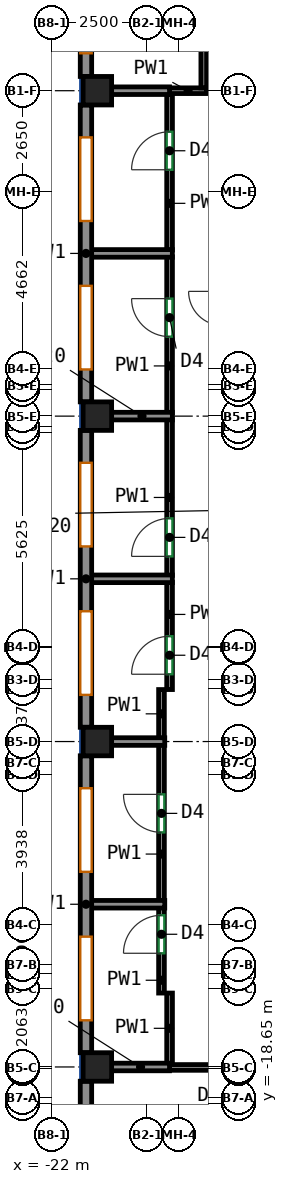
"""IFC4 building model, lengths in metres.
Left out: names, types, materials, properties, quantities, classifications, styles, units other than length and angle.
Written with IfcOpenShell. Run it as: python <this file> out.ifc"""

import sys

from ifc_helpers import new_model, si_unit, direction, frame, frame_2d, origin, origin_2d, place, context, subcontext, project, spatial, rectangle, extrude, source, transform, mapped, element, fill, save


model = new_model("IFC4")
c1 = context("Model", 3, precision=1e-05, world=origin(), true_north=direction((0.0, 1.0)))
c2 = subcontext(c1, "Body", "Model", "MODEL_VIEW")
j1 = project(units=[si_unit("LENGTHUNIT", "METRE"), si_unit("PLANEANGLEUNIT", "RADIAN")], contexts=[c1])
p1 = place(None, origin())
s1 = spatial("IfcSite", under=j1, at=p1, CompositionType="ELEMENT")
p2 = place(p1, origin())
s2 = spatial("IfcBuilding", under=s1, at=p2, CompositionType="ELEMENT")
p3 = place(p2, frame((0.0, 0.0, 206.7)))
s3 = spatial("IfcBuildingStorey", under=s2, at=p3, CompositionType="ELEMENT", Elevation=206.7)
m1 = source(origin(), c2, "Body", "SweptSolid", [
    extrude(rectangle(XDim=0.75, YDim=0.75, at=origin_2d()), origin(), (0.0, 0.0, 1.0), 3.12),
])
for number, where, z_axis, x_axis in (
    (1, (-20.8, -17.688, 0.0), (0.0, 0.0, 1.0), (1.0, 0.0, 0.0)),
    (2, (-20.8, -9.125, 0.0), (0.0, 0.0, 1.0), (1.0, 0.0, 0.0)),
    (3, (-20.8, -0.562, 0.0), (0.0, 0.0, 1.0), (1.0, 0.0, 0.0)),
    (4, (-20.8, 8.0, 0.0), (0.0, 0.0, 1.0), (1.0, 0.0, 0.0)),
):
    element("IfcColumn", number, at=place(p3, frame(where, z_axis=z_axis, x_axis=x_axis)), inside=s3, PredefinedType="COLUMN", context=c2, shape_type="MappedRepresentation", body=[
        mapped(m1, transform((0.0, 0.0, 0.0))),
    ])
m2 = source(origin(), c2, "Body", "SweptSolid", [
    extrude(rectangle(XDim=13.682, YDim=0.3, at=frame_2d((6.841, 0.0))), origin(), (0.0, 0.0, 1.0), 3.12),
])
p4 = place(p3, frame((-21.1, 22.057, 0.0), z_axis=(0.0, 0.0, 1.0), x_axis=(0.0, -1.0, 0.0)))
e5 = element("IfcWall", 5, at=p4, inside=s3, PredefinedType="SOLIDWALL", context=c2, shape_type="MappedRepresentation", body=[
    mapped(m2, transform((0.0, 0.0, 0.0))),
])
p5 = place(p4, frame((0.61, 0.0, 0.85)))
e6 = element("IfcOpeningElement", 6, at=p5, cuts=e5, PredefinedType="OPENING", context=c2, shape_type="SweptSolid", body=[
    extrude(rectangle(XDim=2.2, YDim=1.95, at=frame_2d((1.1, 0.975))), frame((0.0, 0.16, 0.0), z_axis=(0.0, -1.0, 0.0), x_axis=(1.0, 0.0, 0.0)), (0.0, 0.0, 1.0), 0.32),
])
p6 = place(p4, frame((4.031, 0.0, 0.85)))
e7 = element("IfcOpeningElement", 7, at=p6, cuts=e5, PredefinedType="OPENING", context=c2, shape_type="SweptSolid", body=[
    extrude(rectangle(XDim=2.2, YDim=1.95, at=frame_2d((1.1, 0.975))), frame((0.0, 0.16, 0.0), z_axis=(0.0, -1.0, 0.0), x_axis=(1.0, 0.0, 0.0)), (0.0, 0.0, 1.0), 0.32),
])
p7 = place(p4, frame((7.451, 0.0, 0.85)))
e8 = element("IfcOpeningElement", 8, at=p7, cuts=e5, PredefinedType="OPENING", context=c2, shape_type="SweptSolid", body=[
    extrude(rectangle(XDim=2.2, YDim=1.95, at=frame_2d((1.1, 0.975))), frame((0.0, 0.16, 0.0), z_axis=(0.0, -1.0, 0.0), x_axis=(1.0, 0.0, 0.0)), (0.0, 0.0, 1.0), 0.32),
])
p8 = place(p4, frame((10.872, 0.0, 0.85)))
e9 = element("IfcOpeningElement", 9, at=p8, cuts=e5, PredefinedType="OPENING", context=c2, shape_type="SweptSolid", body=[
    extrude(rectangle(XDim=2.2, YDim=1.95, at=frame_2d((1.1, 0.975))), frame((0.0, 0.16, 0.0), z_axis=(0.0, -1.0, 0.0), x_axis=(1.0, 0.0, 0.0)), (0.0, 0.0, 1.0), 0.32),
])
m3 = source(origin(), c2, "Body", "SweptSolid", [
    extrude(rectangle(XDim=7.812, YDim=0.3, at=frame_2d((3.906, 0.0))), origin(), (0.0, 0.0, 1.0), 3.12),
])
p9 = place(p3, frame((-21.1, 7.625, 0.0), z_axis=(0.0, 0.0, 1.0), x_axis=(0.0, -1.0, 0.0)))
e10 = element("IfcWall", 10, at=p9, inside=s3, PredefinedType="SOLIDWALL", context=c2, shape_type="MappedRepresentation", body=[
    mapped(m3, transform((0.0, 0.0, 0.0))),
])
p10 = place(p9, frame((0.853, 0.0, 0.85)))
e11 = element("IfcOpeningElement", 11, at=p10, cuts=e10, PredefinedType="OPENING", context=c2, shape_type="SweptSolid", body=[
    extrude(rectangle(XDim=2.2, YDim=1.95, at=frame_2d((1.1, 0.975))), frame((0.0, 0.16, 0.0), z_axis=(0.0, -1.0, 0.0), x_axis=(1.0, 0.0, 0.0)), (0.0, 0.0, 1.0), 0.32),
])
p11 = place(p9, frame((4.759, 0.0, 0.85)))
e12 = element("IfcOpeningElement", 12, at=p11, cuts=e10, PredefinedType="OPENING", context=c2, shape_type="SweptSolid", body=[
    extrude(rectangle(XDim=2.2, YDim=1.95, at=frame_2d((1.1, 0.975))), frame((0.0, 0.16, 0.0), z_axis=(0.0, -1.0, 0.0), x_axis=(1.0, 0.0, 0.0)), (0.0, 0.0, 1.0), 0.32),
])
p12 = place(p3, frame((-21.1, -0.938, 0.0), z_axis=(0.0, 0.0, 1.0), x_axis=(0.0, -1.0, 0.0)))
e13 = element("IfcWall", 13, at=p12, inside=s3, PredefinedType="SOLIDWALL", context=c2, shape_type="MappedRepresentation", body=[
    mapped(m3, transform((0.0, 0.0, 0.0))),
])
p13 = place(p12, frame((0.853, 0.0, 0.85)))
e14 = element("IfcOpeningElement", 14, at=p13, cuts=e13, PredefinedType="OPENING", context=c2, shape_type="SweptSolid", body=[
    extrude(rectangle(XDim=2.2, YDim=1.95, at=frame_2d((1.1, 0.975))), frame((0.0, 0.16, 0.0), z_axis=(0.0, -1.0, 0.0), x_axis=(1.0, 0.0, 0.0)), (0.0, 0.0, 1.0), 0.32),
])
p14 = place(p12, frame((4.76, 0.0, 0.85)))
e15 = element("IfcOpeningElement", 15, at=p14, cuts=e13, PredefinedType="OPENING", context=c2, shape_type="SweptSolid", body=[
    extrude(rectangle(XDim=2.2, YDim=1.95, at=frame_2d((1.1, 0.975))), frame((0.0, 0.16, 0.0), z_axis=(0.0, -1.0, 0.0), x_axis=(1.0, 0.0, 0.0)), (0.0, 0.0, 1.0), 0.32),
])
p15 = place(p3, frame((-21.1, -9.5, 0.0), z_axis=(0.0, 0.0, 1.0), x_axis=(0.0, -1.0, 0.0)))
e16 = element("IfcWall", 16, at=p15, inside=s3, PredefinedType="SOLIDWALL", context=c2, shape_type="MappedRepresentation", body=[
    mapped(m3, transform((0.0, 0.0, 0.0))),
])
p16 = place(p15, frame((0.853, 0.0, 0.85)))
e17 = element("IfcOpeningElement", 17, at=p16, cuts=e16, PredefinedType="OPENING", context=c2, shape_type="SweptSolid", body=[
    extrude(rectangle(XDim=2.2, YDim=1.95, at=frame_2d((1.1, 0.975))), frame((0.0, 0.16, 0.0), z_axis=(0.0, -1.0, 0.0), x_axis=(1.0, 0.0, 0.0)), (0.0, 0.0, 1.0), 0.32),
])
p17 = place(p15, frame((4.759, 0.0, 0.85)))
e18 = element("IfcOpeningElement", 18, at=p17, cuts=e16, PredefinedType="OPENING", context=c2, shape_type="SweptSolid", body=[
    extrude(rectangle(XDim=2.2, YDim=1.95, at=frame_2d((1.1, 0.975))), frame((0.0, 0.16, 0.0), z_axis=(0.0, -1.0, 0.0), x_axis=(1.0, 0.0, 0.0)), (0.0, 0.0, 1.0), 0.32),
])
m4 = source(origin(), c2, "Body", "SweptSolid", [
    extrude(rectangle(XDim=4.312, YDim=0.3, at=frame_2d((2.156, 0.0))), origin(), (0.0, 0.0, 1.0), 3.12),
])
p18 = place(p3, frame((-21.1, -18.062, 0.0), z_axis=(0.0, 0.0, 1.0), x_axis=(0.0, -1.0, 0.0)))
e19 = element("IfcWall", 19, at=p18, inside=s3, PredefinedType="SOLIDWALL", context=c2, shape_type="MappedRepresentation", body=[
    mapped(m4, transform((0.0, 0.0, 0.0))),
])
p19 = place(p18, frame((1.056, 0.0, 0.85)))
e20 = element("IfcOpeningElement", 20, at=p19, cuts=e19, PredefinedType="OPENING", context=c2, shape_type="SweptSolid", body=[
    extrude(rectangle(XDim=2.2, YDim=1.95, at=frame_2d((1.1, 0.975))), frame((0.0, 0.16, 0.0), z_axis=(0.0, -1.0, 0.0), x_axis=(1.0, 0.0, 0.0)), (0.0, 0.0, 1.0), 0.32),
])
p20 = place(p3, frame((-18.9, -17.7, 0.0), z_axis=(0.0, 0.0, 1.0), x_axis=(1.0, 0.0, 0.0)))
e21 = element("IfcWall", 21, at=p20, inside=s3, PredefinedType="PARTITIONING", context=c2, shape_type="SweptSolid", body=[
    extrude(rectangle(XDim=8.233, YDim=0.15, at=frame_2d((4.116, 0.0))), origin(), (0.0, 0.0, 1.0), 2.52),
])
p21 = place(p20, frame((1.135, 0.0, 0.0)))
e22 = element("IfcOpeningElement", 22, at=p21, cuts=e21, PredefinedType="OPENING", context=c2, shape_type="SweptSolid", body=[
    extrude(rectangle(XDim=1.0, YDim=2.1, at=frame_2d((0.5, 1.05))), frame((0.0, 0.085, 0.0), z_axis=(0.0, -1.0, 0.0), x_axis=(1.0, 0.0, 0.0)), (0.0, 0.0, 1.0), 0.17),
])
p22 = place(p20, frame((5.131, 0.0, 0.0)))
e23 = element("IfcOpeningElement", 23, at=p22, cuts=e21, PredefinedType="OPENING", context=c2, shape_type="SweptSolid", body=[
    extrude(rectangle(XDim=1.0, YDim=2.1, at=frame_2d((0.5, 1.05))), frame((0.0, 0.085, 0.0), z_axis=(0.0, -1.0, 0.0), x_axis=(1.0, 0.0, 0.0)), (0.0, 0.0, 1.0), 0.17),
])
p23 = place(p3, frame((-17.925, 8.0, 0.0), z_axis=(0.0, 0.0, 1.0), x_axis=(-1.0, 0.0, 0.0)))
e24 = element("IfcWall", 24, at=p23, inside=s3, PredefinedType="PARTITIONING", context=c2, shape_type="SweptSolid", body=[
    extrude(rectangle(XDim=0.976, YDim=0.15, at=frame_2d((0.488, 0.0))), origin(), (0.0, 0.0, 1.0), 3.12),
])
p24 = place(p3, frame((-18.0, 21.9, 0.0), z_axis=(0.0, 0.0, 1.0), x_axis=(0.0, -1.0, 0.0)))
e25 = element("IfcWall", 25, at=p24, inside=s3, PredefinedType="PARTITIONING", context=c2, shape_type="SweptSolid", body=[
    extrude(rectangle(XDim=13.825, YDim=0.15, at=frame_2d((6.913, 0.0))), origin(), (0.0, 0.0, 1.0), 3.12),
])
p25 = place(p24, frame((10.721, 0.0, 0.0)))
e26 = element("IfcOpeningElement", 26, at=p25, cuts=e25, PredefinedType="OPENING", context=c2, shape_type="SweptSolid", body=[
    extrude(rectangle(XDim=1.0, YDim=2.1, at=frame_2d((0.5, 1.05))), frame((0.0, 0.085, 0.0), z_axis=(0.0, -1.0, 0.0), x_axis=(1.0, 0.0, 0.0)), (0.0, 0.0, 1.0), 0.17),
])
p26 = place(p3, frame((-18.9, -17.598, 0.0), z_axis=(0.0, 0.0, 1.0), x_axis=(0.0, 1.0, 0.0)))
e27 = element("IfcWall", 27, at=p26, inside=s3, PredefinedType="PARTITIONING", context=c2, shape_type="SweptSolid", body=[
    extrude(rectangle(XDim=1.855, YDim=0.15, at=frame_2d((0.927, 0.0))), origin(), (0.0, 0.0, 1.0), 3.12),
])
p27 = place(p3, frame((-19.113, -15.743, 0.0), z_axis=(0.0, 0.0, 1.0), x_axis=(0.0, 1.0, 0.0)))
e28 = element("IfcWall", 28, at=p27, inside=s3, PredefinedType="PARTITIONING", context=c2, shape_type="SweptSolid", body=[
    extrude(rectangle(XDim=2.247, YDim=0.15, at=frame_2d((1.124, 0.0))), origin(), (0.0, 0.0, 1.0), 3.12),
])
p28 = place(p27, frame((1.047, 0.0, 0.0)))
e29 = element("IfcOpeningElement", 29, at=p28, cuts=e28, PredefinedType="OPENING", context=c2, shape_type="SweptSolid", body=[
    extrude(rectangle(XDim=1.0, YDim=2.1, at=frame_2d((0.5, 1.05))), frame((0.0, 0.085, 0.0), z_axis=(0.0, -1.0, 0.0), x_axis=(1.0, 0.0, 0.0)), (0.0, 0.0, 1.0), 0.17),
])
p29 = place(p3, frame((-19.113, -13.316, 0.0), z_axis=(0.0, 0.0, 1.0), x_axis=(0.0, 1.0, 0.0)))
e30 = element("IfcWall", 30, at=p29, inside=s3, PredefinedType="PARTITIONING", context=c2, shape_type="SweptSolid", body=[
    extrude(rectangle(XDim=4.101, YDim=0.15, at=frame_2d((2.05, 0.0))), origin(), (0.0, 0.0, 1.0), 3.12),
])
p30 = place(p29, frame((1.801, 0.0, 0.0)))
e31 = element("IfcOpeningElement", 31, at=p30, cuts=e30, PredefinedType="OPENING", context=c2, shape_type="SweptSolid", body=[
    extrude(rectangle(XDim=1.0, YDim=2.1, at=frame_2d((0.5, 1.05))), frame((0.0, 0.085, 0.0), z_axis=(0.0, -1.0, 0.0), x_axis=(1.0, 0.0, 0.0)), (0.0, 0.0, 1.0), 0.17),
])
p31 = place(p3, frame((-18.9, -7.757, 0.0), z_axis=(0.0, 0.0, 1.0), x_axis=(0.0, 1.0, 0.0)))
e32 = element("IfcWall", 32, at=p31, inside=s3, PredefinedType="PARTITIONING", context=c2, shape_type="SweptSolid", body=[
    extrude(rectangle(XDim=2.824, YDim=0.15, at=frame_2d((1.412, 0.0))), origin(), (0.0, 0.0, 1.0), 3.12),
])
p32 = place(p31, frame((0.403, 0.0, 0.0)))
e33 = element("IfcOpeningElement", 33, at=p32, cuts=e32, PredefinedType="OPENING", context=c2, shape_type="SweptSolid", body=[
    extrude(rectangle(XDim=1.0, YDim=2.1, at=frame_2d((0.5, 1.05))), frame((0.0, 0.085, 0.0), z_axis=(0.0, -1.0, 0.0), x_axis=(1.0, 0.0, 0.0)), (0.0, 0.0, 1.0), 0.17),
])
p33 = place(p3, frame((-19.113, -9.035, 0.0), z_axis=(0.0, 0.0, 1.0), x_axis=(0.0, 1.0, 0.0)))
e34 = element("IfcWall", 34, at=p33, inside=s3, PredefinedType="PARTITIONING", context=c2, shape_type="SweptSolid", body=[
    extrude(rectangle(XDim=1.278, YDim=0.15, at=frame_2d((0.639, 0.0))), origin(), (0.0, 0.0, 1.0), 3.12),
])
p34 = place(p3, frame((-18.9, -4.753, 0.0), z_axis=(0.0, 0.0, 1.0), x_axis=(0.0, 1.0, 0.0)))
e35 = element("IfcWall", 35, at=p34, inside=s3, PredefinedType="PARTITIONING", context=c2, shape_type="SweptSolid", body=[
    extrude(rectangle(XDim=4.101, YDim=0.15, at=frame_2d((2.05, 0.0))), origin(), (0.0, 0.0, 1.0), 3.12),
])
p35 = place(p34, frame((0.5, 0.0, 0.0)))
e36 = element("IfcOpeningElement", 36, at=p35, cuts=e35, PredefinedType="OPENING", context=c2, shape_type="SweptSolid", body=[
    extrude(rectangle(XDim=1.0, YDim=2.1, at=frame_2d((0.5, 1.05))), frame((0.0, 0.085, 0.0), z_axis=(0.0, -1.0, 0.0), x_axis=(1.0, 0.0, 0.0)), (0.0, 0.0, 1.0), 0.17),
])
p36 = place(p3, frame((-18.9, -0.472, 0.0), z_axis=(0.0, 0.0, 1.0), x_axis=(0.0, 1.0, 0.0)))
e37 = element("IfcWall", 37, at=p36, inside=s3, PredefinedType="PARTITIONING", context=c2, shape_type="SweptSolid", body=[
    extrude(rectangle(XDim=4.101, YDim=0.15, at=frame_2d((2.05, 0.0))), origin(), (0.0, 0.0, 1.0), 3.12),
])
p37 = place(p36, frame((2.001, 0.0, 0.0)))
e38 = element("IfcOpeningElement", 38, at=p37, cuts=e37, PredefinedType="OPENING", context=c2, shape_type="SweptSolid", body=[
    extrude(rectangle(XDim=1.0, YDim=2.1, at=frame_2d((0.5, 1.05))), frame((0.0, 0.085, 0.0), z_axis=(0.0, -1.0, 0.0), x_axis=(1.0, 0.0, 0.0)), (0.0, 0.0, 1.0), 0.17),
])
p38 = place(p3, frame((-18.9, 3.809, 0.0), z_axis=(0.0, 0.0, 1.0), x_axis=(0.0, 1.0, 0.0)))
e39 = element("IfcWall", 39, at=p38, inside=s3, PredefinedType="PARTITIONING", context=c2, shape_type="SweptSolid", body=[
    extrude(rectangle(XDim=4.092, YDim=0.15, at=frame_2d((2.046, 0.0))), origin(), (0.0, 0.0, 1.0), 3.12),
])
p39 = place(p38, frame((2.111, 0.0, 0.0)))
e40 = element("IfcOpeningElement", 40, at=p39, cuts=e39, PredefinedType="OPENING", context=c2, shape_type="SweptSolid", body=[
    extrude(rectangle(XDim=1.0, YDim=2.1, at=frame_2d((0.5, 1.05))), frame((0.0, 0.085, 0.0), z_axis=(0.0, -1.0, 0.0), x_axis=(1.0, 0.0, 0.0)), (0.0, 0.0, 1.0), 0.17),
])
p40 = place(p3, frame((-20.425, -17.688, 0.0), z_axis=(0.0, 0.0, 1.0), x_axis=(1.0, 0.0, 0.0)))
e41 = element("IfcWall", 41, at=p40, inside=s3, PredefinedType="PARTITIONING", context=c2, shape_type="SweptSolid", body=[
    extrude(rectangle(XDim=1.523, YDim=0.2, at=frame_2d((0.761, 0.0))), origin(), (0.0, 0.0, 1.0), 2.52),
])
p41 = place(p3, frame((-20.425, 8.0, 0.0), z_axis=(0.0, 0.0, 1.0), x_axis=(0.999999794741, 0.000640717472, 0.0)))
e42 = element("IfcWall", 42, at=p41, inside=s3, PredefinedType="PARTITIONING", context=c2, shape_type="SweptSolid", body=[
    extrude(rectangle(XDim=1.524, YDim=0.2, at=frame_2d((0.762, 0.0))), origin(), (0.0, 0.0, 1.0), 3.12),
])
p42 = place(p3, frame((-19.027, -13.406, 0.0), z_axis=(0.0, 0.0, 1.0), x_axis=(-1.0, 0.0, 0.0)))
e43 = element("IfcWall", 43, at=p42, inside=s3, PredefinedType="PARTITIONING", context=c2, shape_type="SweptSolid", body=[
    extrude(rectangle(XDim=1.973, YDim=0.2, at=frame_2d((0.986, 0.0))), origin(), (0.0, 0.0, 1.0), 3.12),
])
p43 = place(p3, frame((-20.425, -9.125, 0.0), z_axis=(0.0, 0.0, 1.0), x_axis=(1.0, 0.0, 0.0)))
e44 = element("IfcWall", 44, at=p43, inside=s3, PredefinedType="PARTITIONING", context=c2, shape_type="SweptSolid", body=[
    extrude(rectangle(XDim=1.398, YDim=0.2, at=frame_2d((0.699, 0.0))), origin(), (0.0, 0.0, 1.0), 3.12),
])
p44 = place(p3, frame((-21.0, -4.843, 0.0), z_axis=(0.0, 0.0, 1.0), x_axis=(1.0, 0.0, 0.0)))
e45 = element("IfcWall", 45, at=p44, inside=s3, PredefinedType="PARTITIONING", context=c2, shape_type="SweptSolid", body=[
    extrude(rectangle(XDim=2.173, YDim=0.2, at=frame_2d((1.086, 0.0))), origin(), (0.0, 0.0, 1.0), 3.12),
])
p45 = place(p3, frame((-18.827, -0.562, 0.0), z_axis=(0.0, 0.0, 1.0), x_axis=(-1.0, 0.0, 0.0)))
e46 = element("IfcWall", 46, at=p45, inside=s3, PredefinedType="PARTITIONING", context=c2, shape_type="SweptSolid", body=[
    extrude(rectangle(XDim=1.598, YDim=0.2, at=frame_2d((0.799, 0.0))), origin(), (0.0, 0.0, 1.0), 2.52),
])
p46 = place(p3, frame((-21.0, 3.719, 0.0), z_axis=(0.0, 0.0, 1.0), x_axis=(1.0, 0.0, 0.0)))
e47 = element("IfcWall", 47, at=p46, inside=s3, PredefinedType="PARTITIONING", context=c2, shape_type="SweptSolid", body=[
    extrude(rectangle(XDim=2.173, YDim=0.2, at=frame_2d((1.086, 0.0))), origin(), (0.0, 0.0, 1.0), 3.12),
])
p47 = place(p8, origin())
e48 = element("IfcWindow", 48, at=p47, inside=s3, PartitioningType="SINGLE_PANEL", PredefinedType="WINDOW", context=c2, shape_type="SweptSolid", body=[
    extrude(rectangle(XDim=2.2, YDim=1.95, at=frame_2d((1.1, 0.975))), frame((0.0, 0.03, 0.0), z_axis=(0.0, -1.0, 0.0), x_axis=(1.0, 0.0, 0.0)), (0.0, 0.0, 1.0), 0.06),
])
fill(e9, e48)
p48 = place(p10, origin())
e49 = element("IfcWindow", 49, at=p48, inside=s3, PartitioningType="SINGLE_PANEL", PredefinedType="WINDOW", context=c2, shape_type="SweptSolid", body=[
    extrude(rectangle(XDim=2.2, YDim=1.95, at=frame_2d((1.1, 0.975))), frame((0.0, 0.03, 0.0), z_axis=(0.0, -1.0, 0.0), x_axis=(1.0, 0.0, 0.0)), (0.0, 0.0, 1.0), 0.06),
])
fill(e11, e49)
p49 = place(p11, origin())
e50 = element("IfcWindow", 50, at=p49, inside=s3, PartitioningType="SINGLE_PANEL", PredefinedType="WINDOW", context=c2, shape_type="SweptSolid", body=[
    extrude(rectangle(XDim=2.2, YDim=1.95, at=frame_2d((1.1, 0.975))), frame((0.0, 0.03, 0.0), z_axis=(0.0, -1.0, 0.0), x_axis=(1.0, 0.0, 0.0)), (0.0, 0.0, 1.0), 0.06),
])
fill(e12, e50)
p50 = place(p13, origin())
e51 = element("IfcWindow", 51, at=p50, inside=s3, PartitioningType="SINGLE_PANEL", PredefinedType="WINDOW", context=c2, shape_type="SweptSolid", body=[
    extrude(rectangle(XDim=2.2, YDim=1.95, at=frame_2d((1.1, 0.975))), frame((0.0, 0.03, 0.0), z_axis=(0.0, -1.0, 0.0), x_axis=(1.0, 0.0, 0.0)), (0.0, 0.0, 1.0), 0.06),
])
fill(e14, e51)
p51 = place(p14, origin())
e52 = element("IfcWindow", 52, at=p51, inside=s3, PartitioningType="SINGLE_PANEL", PredefinedType="WINDOW", context=c2, shape_type="SweptSolid", body=[
    extrude(rectangle(XDim=2.2, YDim=1.95, at=frame_2d((1.1, 0.975))), frame((0.0, 0.03, 0.0), z_axis=(0.0, -1.0, 0.0), x_axis=(1.0, 0.0, 0.0)), (0.0, 0.0, 1.0), 0.06),
])
fill(e15, e52)
p52 = place(p16, origin())
e53 = element("IfcWindow", 53, at=p52, inside=s3, PartitioningType="SINGLE_PANEL", PredefinedType="WINDOW", context=c2, shape_type="SweptSolid", body=[
    extrude(rectangle(XDim=2.2, YDim=1.95, at=frame_2d((1.1, 0.975))), frame((0.0, 0.03, 0.0), z_axis=(0.0, -1.0, 0.0), x_axis=(1.0, 0.0, 0.0)), (0.0, 0.0, 1.0), 0.06),
])
fill(e17, e53)
p53 = place(p17, origin())
e54 = element("IfcWindow", 54, at=p53, inside=s3, PartitioningType="SINGLE_PANEL", PredefinedType="WINDOW", context=c2, shape_type="SweptSolid", body=[
    extrude(rectangle(XDim=2.2, YDim=1.95, at=frame_2d((1.1, 0.975))), frame((0.0, 0.03, 0.0), z_axis=(0.0, -1.0, 0.0), x_axis=(1.0, 0.0, 0.0)), (0.0, 0.0, 1.0), 0.06),
])
fill(e18, e54)
p54 = place(p28, origin())
e55 = element("IfcDoor", 55, at=p54, inside=s3, OperationType="SINGLE_SWING_LEFT", PredefinedType="DOOR", context=c2, shape_type="SweptSolid", body=[
    extrude(rectangle(XDim=1.0, YDim=2.1, at=frame_2d((0.5, 1.05))), frame((0.0, 0.025, 0.0), z_axis=(0.0, -1.0, 0.0), x_axis=(1.0, 0.0, 0.0)), (0.0, 0.0, 1.0), 0.05),
])
fill(e29, e55)
p55 = place(p30, origin())
e56 = element("IfcDoor", 56, at=p55, inside=s3, OperationType="SINGLE_SWING_RIGHT", PredefinedType="DOOR", context=c2, shape_type="SweptSolid", body=[
    extrude(rectangle(XDim=1.0, YDim=2.1, at=frame_2d((0.5, 1.05))), frame((0.0, 0.025, 0.0), z_axis=(0.0, -1.0, 0.0), x_axis=(1.0, 0.0, 0.0)), (0.0, 0.0, 1.0), 0.05),
])
fill(e31, e56)
p56 = place(p32, origin())
e57 = element("IfcDoor", 57, at=p56, inside=s3, OperationType="SINGLE_SWING_LEFT", PredefinedType="DOOR", context=c2, shape_type="SweptSolid", body=[
    extrude(rectangle(XDim=1.0, YDim=2.1, at=frame_2d((0.5, 1.05))), frame((0.0, 0.025, 0.0), z_axis=(0.0, -1.0, 0.0), x_axis=(1.0, 0.0, 0.0)), (0.0, 0.0, 1.0), 0.05),
])
fill(e33, e57)
p57 = place(p35, origin())
e58 = element("IfcDoor", 58, at=p57, inside=s3, OperationType="SINGLE_SWING_LEFT", PredefinedType="DOOR", context=c2, shape_type="SweptSolid", body=[
    extrude(rectangle(XDim=1.0, YDim=2.1, at=frame_2d((0.5, 1.05))), frame((0.0, 0.025, 0.0), z_axis=(0.0, -1.0, 0.0), x_axis=(1.0, 0.0, 0.0)), (0.0, 0.0, 1.0), 0.05),
])
fill(e36, e58)
p58 = place(p37, origin())
e59 = element("IfcDoor", 59, at=p58, inside=s3, OperationType="SINGLE_SWING_RIGHT", PredefinedType="DOOR", context=c2, shape_type="SweptSolid", body=[
    extrude(rectangle(XDim=1.0, YDim=2.1, at=frame_2d((0.5, 1.05))), frame((0.0, 0.025, 0.0), z_axis=(0.0, -1.0, 0.0), x_axis=(1.0, 0.0, 0.0)), (0.0, 0.0, 1.0), 0.05),
])
fill(e38, e59)
p59 = place(p39, origin())
e60 = element("IfcDoor", 60, at=p59, inside=s3, OperationType="SINGLE_SWING_LEFT", PredefinedType="DOOR", context=c2, shape_type="SweptSolid", body=[
    extrude(rectangle(XDim=1.0, YDim=2.1, at=frame_2d((0.5, 1.05))), frame((0.0, 0.025, 0.0), z_axis=(0.0, -1.0, 0.0), x_axis=(1.0, 0.0, 0.0)), (0.0, 0.0, 1.0), 0.05),
])
fill(e40, e60)
save(model, sys.argv[1])
